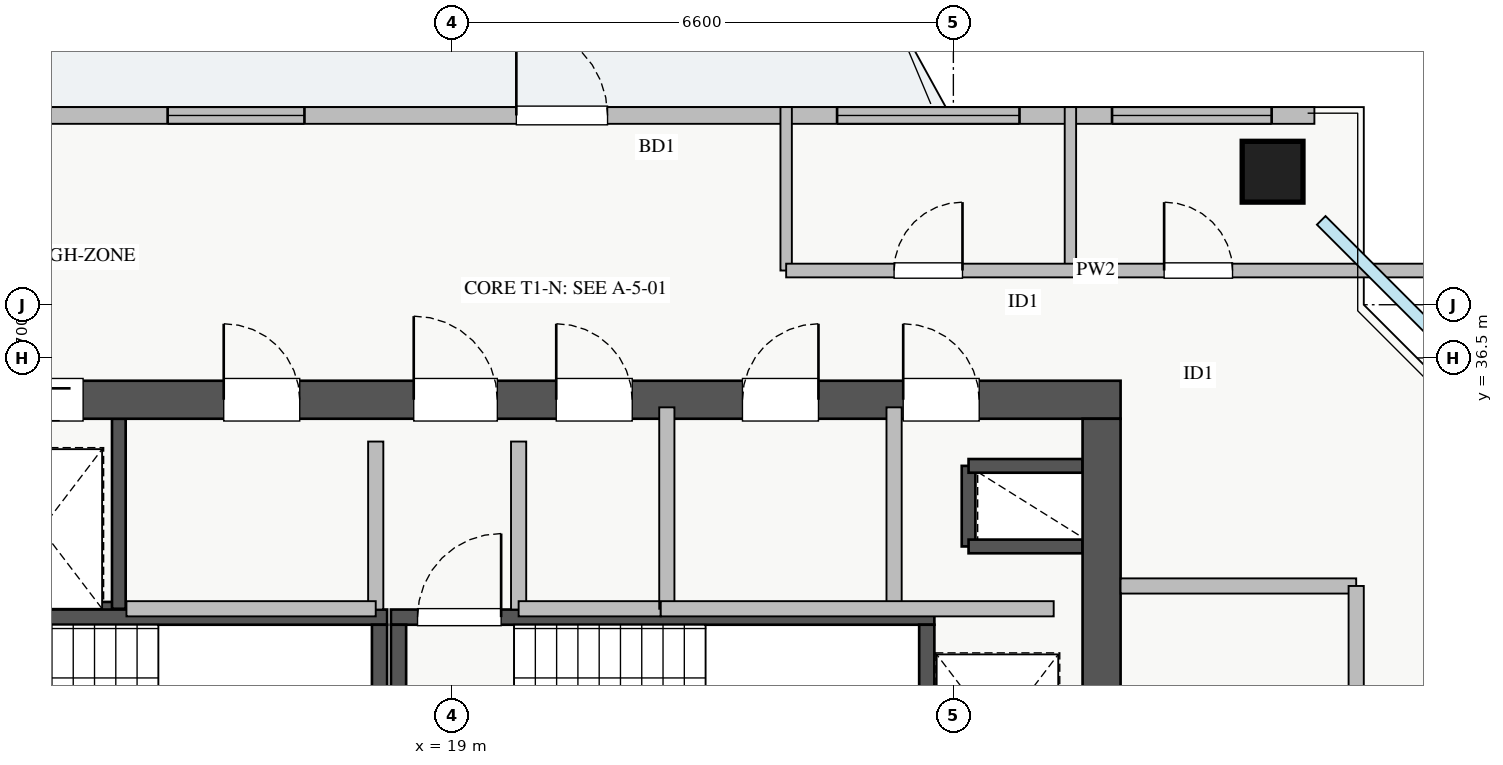
"""IFC4 building model, lengths in metres.
Left out: names, types, materials, properties, quantities, classifications, styles, units other than length and angle.
Written with IfcOpenShell. Run it as: python <this file> out.ifc"""

import sys

from ifc_helpers import new_model, si_unit, direction, frame, frame_2d, origin, origin_2d, place, context, subcontext, project, spatial, rectangle, extrude, source, transform, mapped, element, fill, save


model = new_model("IFC4")
c1 = context("Model", 3, precision=1e-05, world=origin(), true_north=direction((0.0, 1.0)))
c2 = subcontext(c1, "Body", "Model", "MODEL_VIEW")
j1 = project(units=[si_unit("LENGTHUNIT", "METRE"), si_unit("PLANEANGLEUNIT", "RADIAN")], contexts=[c1])
p1 = place(None, origin())
s1 = spatial("IfcSite", under=j1, at=p1, CompositionType="ELEMENT")
p2 = place(p1, origin())
s2 = spatial("IfcBuilding", under=s1, at=p2, CompositionType="ELEMENT")
p3 = place(p2, frame((0.0, 0.0, 216.5)))
s3 = spatial("IfcBuildingStorey", under=s2, at=p3, CompositionType="ELEMENT", Elevation=216.5)
p4 = place(p3, frame((12.68, 33.2, 0.0), z_axis=(0.0, 0.0, 1.0), x_axis=(1.0, 0.0, 0.0)))
e1 = element("IfcWall", 1, at=p4, inside=s3, PredefinedType="SHEAR", context=c2, shape_type="SweptSolid", body=[
    extrude(rectangle(XDim=1.94, YDim=0.18, at=frame_2d((0.97, 0.0))), origin(), (0.0, 0.0, 1.0), 3.07),
])
p5 = place(p3, frame((14.62, 33.2, 0.0), z_axis=(0.0, 0.0, 1.0), x_axis=(0.0, 1.0, 0.0)))
e2 = element("IfcWall", 2, at=p5, inside=s3, PredefinedType="SHEAR", context=c2, shape_type="SweptSolid", body=[
    extrude(rectangle(XDim=2.5, YDim=0.18, at=frame_2d((1.25, 0.0))), origin(), (0.0, 0.0, 1.0), 3.07),
])
p6 = place(p3, frame((25.8, 34.02, 0.0), z_axis=(0.0, 0.0, 1.0), x_axis=(0.0, 1.0, 0.0)))
e3 = element("IfcWall", 3, at=p6, inside=s3, PredefinedType="SHEAR", context=c2, shape_type="SweptSolid", body=[
    extrude(rectangle(XDim=1.06, YDim=0.18, at=frame_2d((0.53, 0.0))), origin(), (0.0, 0.0, 1.0), 3.07),
])
for number, where, z_axis, x_axis in (
    (4, (25.8, 35.08, 0.0), (0.0, 0.0, 1.0), (1.0, 0.0, 0.0)),
    (5, (25.8, 34.02, 0.0), (0.0, 0.0, 1.0), (1.0, 0.0, 0.0)),
):
    element("IfcWall", number, at=place(p3, frame(where, z_axis=z_axis, x_axis=x_axis)), inside=s3, PredefinedType="SHEAR", context=c2, shape_type="SweptSolid", body=[
        extrude(rectangle(XDim=1.5, YDim=0.18, at=frame_2d((0.75, 0.0))), origin(), (0.0, 0.0, 1.0), 3.07),
    ])
p7 = place(p3, frame((10.7, 33.09, 0.0), z_axis=(0.0, 0.0, 1.0), x_axis=(1.0, 0.0, 0.0)))
e6 = element("IfcWall", 6, at=p7, inside=s3, PredefinedType="SHEAR", context=c2, shape_type="SweptSolid", body=[
    extrude(rectangle(XDim=7.45, YDim=0.2, at=frame_2d((3.725, 0.0))), origin(), (0.0, 0.0, 1.0), 3.25),
])
p8 = place(p7, frame((0.35, 0.0, 0.0)))
e7 = element("IfcOpeningElement", 7, at=p8, cuts=e6, PredefinedType="OPENING", context=c2, shape_type="SweptSolid", body=[
    extrude(rectangle(XDim=1.1, YDim=2.05, at=frame_2d((0.55, 1.025))), frame((0.0, 0.11, 0.0), z_axis=(0.0, -1.0, 0.0), x_axis=(1.0, 0.0, 0.0)), (0.0, 0.0, 1.0), 0.22),
])
p9 = place(p3, frame((18.05, 30.05, 0.0), z_axis=(0.0, 0.0, 1.0), x_axis=(0.0, 1.0, 0.0)))
e8 = element("IfcWall", 8, at=p9, inside=s3, PredefinedType="SHEAR", context=c2, shape_type="SweptSolid", body=[
    extrude(rectangle(XDim=2.94, YDim=0.2, at=frame_2d((1.47, 0.0))), origin(), (0.0, 0.0, 1.0), 3.25),
])
p10 = place(p3, frame((18.2, 33.09, 0.0), z_axis=(0.0, 0.0, 1.0), x_axis=(1.0, 0.0, 0.0)))
e9 = element("IfcWall", 9, at=p10, inside=s3, PredefinedType="SHEAR", context=c2, shape_type="SweptSolid", body=[
    extrude(rectangle(XDim=7.15, YDim=0.2, at=frame_2d((3.575, 0.0))), origin(), (0.0, 0.0, 1.0), 3.25),
])
p11 = place(p10, frame((0.35, 0.0, 0.0)))
e10 = element("IfcOpeningElement", 10, at=p11, cuts=e9, PredefinedType="OPENING", context=c2, shape_type="SweptSolid", body=[
    extrude(rectangle(XDim=1.1, YDim=2.05, at=frame_2d((0.55, 1.025))), frame((0.0, 0.11, 0.0), z_axis=(0.0, -1.0, 0.0), x_axis=(1.0, 0.0, 0.0)), (0.0, 0.0, 1.0), 0.22),
])
for number, where, z_axis, x_axis in (
    (11, (18.3, 30.05, 0.0), (0.0, 0.0, 1.0), (0.0, 1.0, 0.0)),
    (12, (25.25, 30.05, 0.0), (0.0, 0.0, 1.0), (0.0, 1.0, 0.0)),
):
    element("IfcWall", number, at=place(p3, frame(where, z_axis=z_axis, x_axis=x_axis)), inside=s3, PredefinedType="SHEAR", context=c2, shape_type="SweptSolid", body=[
        extrude(rectangle(XDim=2.94, YDim=0.2, at=frame_2d((1.47, 0.0))), origin(), (0.0, 0.0, 1.0), 3.25),
    ])
p12 = place(p3, frame((10.2, 35.95, 0.0), z_axis=(0.0, 0.0, 1.0), x_axis=(1.0, 0.0, 0.0)))
e13 = element("IfcWall", 13, at=p12, inside=s3, PredefinedType="SHEAR", context=c2, shape_type="SweptSolid", body=[
    extrude(rectangle(XDim=17.6, YDim=0.5, at=frame_2d((8.8, 0.0))), origin(), (0.0, 0.0, 1.0), 3.25),
])
p13 = place(p12, frame((1.15, 0.0, 0.0)))
e14 = element("IfcOpeningElement", 14, at=p13, cuts=e13, PredefinedType="OPENING", context=c2, shape_type="SweptSolid", body=[
    extrude(rectangle(XDim=1.1, YDim=2.05, at=frame_2d((0.55, 1.025))), frame((0.0, 0.26, 0.0), z_axis=(0.0, -1.0, 0.0), x_axis=(1.0, 0.0, 0.0)), (0.0, 0.0, 1.0), 0.52),
])
p14 = place(p12, frame((8.3, 0.0, 0.0)))
e15 = element("IfcOpeningElement", 15, at=p14, cuts=e13, PredefinedType="OPENING", context=c2, shape_type="SweptSolid", body=[
    extrude(rectangle(XDim=1.1, YDim=2.05, at=frame_2d((0.55, 1.025))), frame((0.0, 0.26, 0.0), z_axis=(0.0, -1.0, 0.0), x_axis=(1.0, 0.0, 0.0)), (0.0, 0.0, 1.0), 0.52),
])
p15 = place(p12, frame((2.85, 0.0, 0.0)))
e16 = element("IfcOpeningElement", 16, at=p15, cuts=e13, PredefinedType="OPENING", context=c2, shape_type="SweptSolid", body=[
    extrude(rectangle(XDim=1.1, YDim=2.05, at=frame_2d((0.55, 1.025))), frame((0.0, 0.26, 0.0), z_axis=(0.0, -1.0, 0.0), x_axis=(1.0, 0.0, 0.0)), (0.0, 0.0, 1.0), 0.52),
])
p16 = place(p12, frame((5.8, 0.0, 0.0)))
e17 = element("IfcOpeningElement", 17, at=p16, cuts=e13, PredefinedType="OPENING", context=c2, shape_type="SweptSolid", body=[
    extrude(rectangle(XDim=1.0, YDim=2.05, at=frame_2d((0.5, 1.025))), frame((0.0, 0.26, 0.0), z_axis=(0.0, -1.0, 0.0), x_axis=(1.0, 0.0, 0.0)), (0.0, 0.0, 1.0), 0.52),
])
p17 = place(p12, frame((14.74, 0.0, 0.0)))
e18 = element("IfcOpeningElement", 18, at=p17, cuts=e13, PredefinedType="OPENING", context=c2, shape_type="SweptSolid", body=[
    extrude(rectangle(XDim=1.0, YDim=2.05, at=frame_2d((0.5, 1.025))), frame((0.0, 0.26, 0.0), z_axis=(0.0, -1.0, 0.0), x_axis=(1.0, 0.0, 0.0)), (0.0, 0.0, 1.0), 0.52),
])
p18 = place(p12, frame((10.175, 0.0, 0.0)))
e19 = element("IfcOpeningElement", 19, at=p18, cuts=e13, PredefinedType="OPENING", context=c2, shape_type="SweptSolid", body=[
    extrude(rectangle(XDim=1.0, YDim=2.05, at=frame_2d((0.5, 1.025))), frame((0.0, 0.26, 0.0), z_axis=(0.0, -1.0, 0.0), x_axis=(1.0, 0.0, 0.0)), (0.0, 0.0, 1.0), 0.52),
])
p19 = place(p12, frame((12.625, 0.0, 0.0)))
e20 = element("IfcOpeningElement", 20, at=p19, cuts=e13, PredefinedType="OPENING", context=c2, shape_type="SweptSolid", body=[
    extrude(rectangle(XDim=1.0, YDim=2.05, at=frame_2d((0.5, 1.025))), frame((0.0, 0.26, 0.0), z_axis=(0.0, -1.0, 0.0), x_axis=(1.0, 0.0, 0.0)), (0.0, 0.0, 1.0), 0.52),
])
p20 = place(p3, frame((27.55, 29.5, 0.0), z_axis=(0.0, 0.0, 1.0), x_axis=(0.0, 1.0, 0.0)))
e21 = element("IfcWall", 21, at=p20, inside=s3, PredefinedType="SHEAR", context=c2, shape_type="SweptSolid", body=[
    extrude(rectangle(XDim=6.2, YDim=0.5, at=frame_2d((3.1, 0.0))), origin(), (0.0, 0.0, 1.0), 3.25),
])
p21 = place(p20, frame((1.1, 0.0, 0.0)))
e22 = element("IfcOpeningElement", 22, at=p21, cuts=e21, PredefinedType="OPENING", context=c2, shape_type="SweptSolid", body=[
    extrude(rectangle(XDim=1.3, YDim=2.05, at=frame_2d((0.65, 1.025))), frame((0.0, 0.26, 0.0), z_axis=(0.0, -1.0, 0.0), x_axis=(1.0, 0.0, 0.0)), (0.0, 0.0, 1.0), 0.52),
])
m1 = source(origin(), c2, "Body", "SweptSolid", [
    extrude(rectangle(XDim=0.8, YDim=0.8, at=origin_2d()), origin(), (0.0, 0.0, 1.0), 3.25),
])
p22 = place(p3, frame((29.8, 38.95, 0.0), z_axis=(0.0, 0.0, 1.0), x_axis=(1.0, 0.0, 0.0)))
e23 = element("IfcColumn", 23, at=p22, inside=s3, PredefinedType="COLUMN", context=c2, shape_type="MappedRepresentation", body=[
    mapped(m1, transform((0.0, 0.0, 0.0), x_axis=(1.0, 0.0, 0.0), y_axis=(0.0, 1.0, 0.0), z_axis=(0.0, 0.0, 1.0), scale=1.0)),
])
p23 = place(p3, frame((7.65, 39.69, 0.0), z_axis=(0.0, 0.0, 1.0), x_axis=(1.0, 0.0, 0.0)))
e24 = element("IfcWall", 24, at=p23, inside=s3, PredefinedType="STANDARD", context=c2, shape_type="SweptSolid", body=[
    extrude(rectangle(XDim=22.7, YDim=0.22, at=frame_2d((11.35, 0.0))), origin(), (0.0, 0.0, 1.0), 2.61),
])
p24 = place(p23, frame((12.2, 0.0, 0.0)))
e25 = element("IfcOpeningElement", 25, at=p24, cuts=e24, PredefinedType="OPENING", context=c2, shape_type="SweptSolid", body=[
    extrude(rectangle(XDim=1.2, YDim=2.1, at=frame_2d((0.6, 1.05))), frame((0.0, 0.12, 0.0), z_axis=(0.0, -1.0, 0.0), x_axis=(1.0, 0.0, 0.0)), (0.0, 0.0, 1.0), 0.24),
])
p25 = place(p23, frame((1.637, 0.0, 0.9)))
e26 = element("IfcOpeningElement", 26, at=p25, cuts=e24, PredefinedType="OPENING", context=c2, shape_type="SweptSolid", body=[
    extrude(rectangle(XDim=2.4, YDim=1.48, at=frame_2d((1.2, 0.74))), frame((0.0, 0.12, 0.0), z_axis=(0.0, -1.0, 0.0), x_axis=(1.0, 0.0, 0.0)), (0.0, 0.0, 1.0), 0.24),
])
p26 = place(p23, frame((7.612, 0.0, 0.9)))
e27 = element("IfcOpeningElement", 27, at=p26, cuts=e24, PredefinedType="OPENING", context=c2, shape_type="SweptSolid", body=[
    extrude(rectangle(XDim=1.8, YDim=1.45, at=frame_2d((0.9, 0.725))), frame((0.0, 0.12, 0.0), z_axis=(0.0, -1.0, 0.0), x_axis=(1.0, 0.0, 0.0)), (0.0, 0.0, 1.0), 0.24),
])
p27 = place(p23, frame((20.038, 0.0, 0.9)))
e28 = element("IfcOpeningElement", 28, at=p27, cuts=e24, PredefinedType="OPENING", context=c2, shape_type="SweptSolid", body=[
    extrude(rectangle(XDim=2.1, YDim=1.5, at=frame_2d((1.05, 0.75))), frame((0.0, 0.12, 0.0), z_axis=(0.0, -1.0, 0.0), x_axis=(1.0, 0.0, 0.0)), (0.0, 0.0, 1.0), 0.24),
])
p28 = place(p23, frame((16.42, 0.0, 0.9)))
e29 = element("IfcOpeningElement", 29, at=p28, cuts=e24, PredefinedType="OPENING", context=c2, shape_type="SweptSolid", body=[
    extrude(rectangle(XDim=2.4, YDim=1.5, at=frame_2d((1.2, 0.75))), frame((0.0, 0.12, 0.0), z_axis=(0.0, -1.0, 0.0), x_axis=(1.0, 0.0, 0.0)), (0.0, 0.0, 1.0), 0.24),
])
p29 = place(p3, frame((27.8, 33.5, 0.0), z_axis=(0.0, 0.0, 1.0), x_axis=(1.0, 0.0, 0.0)))
e30 = element("IfcWall", 30, at=p29, inside=s3, PredefinedType="PARTITIONING", context=c2, shape_type="SweptSolid", body=[
    extrude(rectangle(XDim=3.1, YDim=0.2, at=frame_2d((1.55, 0.0))), origin(), (0.0, 0.0, 1.0), 2.265),
])
p30 = place(p3, frame((30.9, 29.6, 0.0), z_axis=(0.0, 0.0, 1.0), x_axis=(0.0, 1.0, 0.0)))
e31 = element("IfcWall", 31, at=p30, inside=s3, PredefinedType="PARTITIONING", context=c2, shape_type="SweptSolid", body=[
    extrude(rectangle(XDim=3.9, YDim=0.2, at=frame_2d((1.95, 0.0))), origin(), (0.0, 0.0, 1.0), 3.07),
])
p31 = place(p30, frame((1.4, 0.0, 0.0)))
e32 = element("IfcOpeningElement", 32, at=p31, cuts=e31, PredefinedType="OPENING", context=c2, shape_type="SweptSolid", body=[
    extrude(rectangle(XDim=1.1, YDim=2.05, at=frame_2d((0.55, 1.025))), frame((0.0, 0.11, 0.0), z_axis=(0.0, -1.0, 0.0), x_axis=(1.0, 0.0, 0.0)), (0.0, 0.0, 1.0), 0.22),
])
for number, where, z_axis, x_axis in (
    (33, (18.0, 33.19, 0.0), (0.0, 0.0, 1.0), (0.0, 1.0, 0.0)),
    (34, (19.88, 33.19, 0.0), (0.0, 0.0, 1.0), (0.0, 1.0, 0.0)),
):
    element("IfcWall", number, at=place(p3, frame(where, z_axis=z_axis, x_axis=x_axis)), inside=s3, PredefinedType="PARTITIONING", context=c2, shape_type="SweptSolid", body=[
        extrude(rectangle(XDim=2.21, YDim=0.2, at=frame_2d((1.105, 0.0))), origin(), (0.0, 0.0, 1.0), 3.07),
    ])
p32 = place(p3, frame((14.72, 33.2, 0.0), z_axis=(0.0, 0.0, 1.0), x_axis=(1.0, 0.0, 0.0)))
e35 = element("IfcWall", 35, at=p32, inside=s3, PredefinedType="PARTITIONING", context=c2, shape_type="SweptSolid", body=[
    extrude(rectangle(XDim=3.28, YDim=0.2, at=frame_2d((1.64, 0.0))), origin(), (0.0, 0.0, 1.0), 3.07),
])
p33 = place(p3, frame((24.82, 33.2, 0.0), z_axis=(0.0, 0.0, 1.0), x_axis=(0.0, 1.0, 0.0)))
e36 = element("IfcWall", 36, at=p33, inside=s3, PredefinedType="PARTITIONING", context=c2, shape_type="SweptSolid", body=[
    extrude(rectangle(XDim=2.65, YDim=0.2, at=frame_2d((1.325, 0.0))), origin(), (0.0, 0.0, 1.0), 3.07),
])
p34 = place(p3, frame((19.88, 33.2, 0.0), z_axis=(0.0, 0.0, 1.0), x_axis=(1.0, 0.0, 0.0)))
e37 = element("IfcWall", 37, at=p34, inside=s3, PredefinedType="PARTITIONING", context=c2, shape_type="SweptSolid", body=[
    extrude(rectangle(XDim=1.87, YDim=0.2, at=frame_2d((0.935, 0.0))), origin(), (0.0, 0.0, 1.0), 3.07),
])
p35 = place(p3, frame((21.83, 33.2, 0.0), z_axis=(0.0, 0.0, 1.0), x_axis=(0.0, 1.0, 0.0)))
e38 = element("IfcWall", 38, at=p35, inside=s3, PredefinedType="PARTITIONING", context=c2, shape_type="SweptSolid", body=[
    extrude(rectangle(XDim=2.65, YDim=0.2, at=frame_2d((1.325, 0.0))), origin(), (0.0, 0.0, 1.0), 3.07),
])
p36 = place(p3, frame((21.75, 33.2, 0.0), z_axis=(0.0, 0.0, 1.0), x_axis=(1.0, 0.0, 0.0)))
e39 = element("IfcWall", 39, at=p36, inside=s3, PredefinedType="PARTITIONING", context=c2, shape_type="SweptSolid", body=[
    extrude(rectangle(XDim=5.17, YDim=0.2, at=frame_2d((2.585, 0.0))), origin(), (0.0, 0.0, 1.0), 3.07),
])
for number, where, z_axis, x_axis in (
    (40, (23.4, 37.65, 0.0), (0.0, 0.0, 1.0), (0.0, 1.0, 0.0)),
    (41, (27.14, 37.65, 0.0), (0.0, 0.0, 1.0), (0.0, 1.0, 0.0)),
):
    element("IfcWall", number, at=place(p3, frame(where, z_axis=z_axis, x_axis=x_axis)), inside=s3, PredefinedType="PARTITIONING", context=c2, shape_type="SweptSolid", body=[
        extrude(rectangle(XDim=2.15, YDim=0.15, at=frame_2d((1.075, 0.0))), origin(), (0.0, 0.0, 1.0), 3.07),
    ])
p37 = place(p3, frame((23.4, 37.65, 0.0), z_axis=(0.0, 0.0, 1.0), x_axis=(1.0, 0.0, 0.0)))
e42 = element("IfcWall", 42, at=p37, inside=s3, PredefinedType="PARTITIONING", context=c2, shape_type="SweptSolid", body=[
    extrude(rectangle(XDim=9.05, YDim=0.18, at=frame_2d((4.525, 0.0))), origin(), (0.0, 0.0, 1.0), 3.07),
])
p38 = place(p37, frame((1.42, 0.0, 0.0)))
e43 = element("IfcOpeningElement", 43, at=p38, cuts=e42, PredefinedType="OPENING", context=c2, shape_type="SweptSolid", body=[
    extrude(rectangle(XDim=0.9, YDim=2.05, at=frame_2d((0.45, 1.025))), frame((0.0, 0.1, 0.0), z_axis=(0.0, -1.0, 0.0), x_axis=(1.0, 0.0, 0.0)), (0.0, 0.0, 1.0), 0.2),
])
p39 = place(p37, frame((4.973, 0.0, 0.0)))
e44 = element("IfcOpeningElement", 44, at=p39, cuts=e42, PredefinedType="OPENING", context=c2, shape_type="SweptSolid", body=[
    extrude(rectangle(XDim=0.9, YDim=2.05, at=frame_2d((0.45, 1.025))), frame((0.0, 0.1, 0.0), z_axis=(0.0, -1.0, 0.0), x_axis=(1.0, 0.0, 0.0)), (0.0, 0.0, 1.0), 0.2),
])
m2 = source(origin(), c2, "Body", "SweptSolid", [
    extrude(rectangle(XDim=1.2, YDim=2.1, at=frame_2d((0.6, 1.05))), frame((0.0, 0.025, 0.0), z_axis=(0.0, -1.0, 0.0), x_axis=(1.0, 0.0, 0.0)), (0.0, 0.0, 1.0), 0.05),
])
p40 = place(p24, origin())
e45 = element("IfcDoor", 45, at=p40, inside=s3, OperationType="SINGLE_SWING_LEFT", PredefinedType="DOOR", context=c2, shape_type="MappedRepresentation", body=[
    mapped(m2, transform((0.0, 0.0, 0.0), x_axis=(1.0, 0.0, 0.0), y_axis=(0.0, 1.0, 0.0), z_axis=(0.0, 0.0, 1.0), scale=1.0)),
])
fill(e25, e45)
m3 = source(origin(), c2, "Body", "SweptSolid", [
    extrude(rectangle(XDim=1.8, YDim=1.45, at=frame_2d((0.9, 0.725))), frame((0.0, 0.03, 0.0), z_axis=(0.0, -1.0, 0.0), x_axis=(1.0, 0.0, 0.0)), (0.0, 0.0, 1.0), 0.06),
])
p41 = place(p26, origin())
e46 = element("IfcWindow", 46, at=p41, inside=s3, PartitioningType="DOUBLE_PANEL_VERTICAL", PredefinedType="WINDOW", context=c2, shape_type="MappedRepresentation", body=[
    mapped(m3, transform((0.0, 0.0, 0.0), x_axis=(1.0, 0.0, 0.0), y_axis=(0.0, 1.0, 0.0), z_axis=(0.0, 0.0, 1.0), scale=1.0)),
])
fill(e27, e46)
m4 = source(origin(), c2, "Body", "SweptSolid", [
    extrude(rectangle(XDim=2.1, YDim=1.5, at=frame_2d((1.05, 0.75))), frame((0.0, 0.03, 0.0), z_axis=(0.0, -1.0, 0.0), x_axis=(1.0, 0.0, 0.0)), (0.0, 0.0, 1.0), 0.06),
])
p42 = place(p27, origin())
e47 = element("IfcWindow", 47, at=p42, inside=s3, PartitioningType="TRIPLE_PANEL_VERTICAL", PredefinedType="WINDOW", context=c2, shape_type="MappedRepresentation", body=[
    mapped(m4, transform((0.0, 0.0, 0.0), x_axis=(1.0, 0.0, 0.0), y_axis=(0.0, 1.0, 0.0), z_axis=(0.0, 0.0, 1.0), scale=1.0)),
])
fill(e28, e47)
m5 = source(origin(), c2, "Body", "SweptSolid", [
    extrude(rectangle(XDim=1.1, YDim=2.05, at=frame_2d((0.55, 1.025))), frame((0.0, 0.025, 0.0), z_axis=(0.0, -1.0, 0.0), x_axis=(1.0, 0.0, 0.0)), (0.0, 0.0, 1.0), 0.05),
])
p43 = place(p14, origin())
e48 = element("IfcDoor", 48, at=p43, inside=s3, OperationType="SINGLE_SWING_LEFT", PredefinedType="DOOR", context=c2, shape_type="MappedRepresentation", body=[
    mapped(m5, transform((0.0, 0.0, 0.0), x_axis=(1.0, 0.0, 0.0), y_axis=(0.0, 1.0, 0.0), z_axis=(0.0, 0.0, 1.0), scale=1.0)),
])
fill(e15, e48)
p44 = place(p11, origin())
e49 = element("IfcDoor", 49, at=p44, inside=s3, OperationType="SINGLE_SWING_RIGHT", PredefinedType="DOOR", context=c2, shape_type="MappedRepresentation", body=[
    mapped(m5, transform((0.0, 0.0, 0.0), x_axis=(1.0, 0.0, 0.0), y_axis=(0.0, 1.0, 0.0), z_axis=(0.0, 0.0, 1.0), scale=1.0)),
])
fill(e10, e49)
p45 = place(p15, origin())
e50 = element("IfcDoor", 50, at=p45, inside=s3, OperationType="SLIDING_TO_LEFT", PredefinedType="DOOR", context=c2, shape_type="MappedRepresentation", body=[
    mapped(m5, transform((0.0, 0.0, 0.0), x_axis=(1.0, 0.0, 0.0), y_axis=(0.0, 1.0, 0.0), z_axis=(0.0, 0.0, 1.0), scale=1.0)),
])
fill(e16, e50)
m6 = source(origin(), c2, "Body", "SweptSolid", [
    extrude(rectangle(XDim=1.0, YDim=2.05, at=frame_2d((0.5, 1.025))), frame((0.0, 0.025, 0.0), z_axis=(0.0, -1.0, 0.0), x_axis=(1.0, 0.0, 0.0)), (0.0, 0.0, 1.0), 0.05),
])
p46 = place(p16, origin())
e51 = element("IfcDoor", 51, at=p46, inside=s3, OperationType="SINGLE_SWING_LEFT", PredefinedType="DOOR", context=c2, shape_type="MappedRepresentation", body=[
    mapped(m6, transform((0.0, 0.0, 0.0), x_axis=(1.0, 0.0, 0.0), y_axis=(0.0, 1.0, 0.0), z_axis=(0.0, 0.0, 1.0), scale=1.0)),
])
fill(e17, e51)
p47 = place(p17, origin())
e52 = element("IfcDoor", 52, at=p47, inside=s3, OperationType="SINGLE_SWING_LEFT", PredefinedType="DOOR", context=c2, shape_type="MappedRepresentation", body=[
    mapped(m6, transform((0.0, 0.0, 0.0), x_axis=(1.0, 0.0, 0.0), y_axis=(0.0, 1.0, 0.0), z_axis=(0.0, 0.0, 1.0), scale=1.0)),
])
fill(e18, e52)
p48 = place(p18, origin())
e53 = element("IfcDoor", 53, at=p48, inside=s3, OperationType="SINGLE_SWING_LEFT", PredefinedType="DOOR", context=c2, shape_type="MappedRepresentation", body=[
    mapped(m6, transform((0.0, 0.0, 0.0), x_axis=(1.0, 0.0, 0.0), y_axis=(0.0, 1.0, 0.0), z_axis=(0.0, 0.0, 1.0), scale=1.0)),
])
fill(e19, e53)
p49 = place(p19, origin())
e54 = element("IfcDoor", 54, at=p49, inside=s3, OperationType="SINGLE_SWING_RIGHT", PredefinedType="DOOR", context=c2, shape_type="MappedRepresentation", body=[
    mapped(m6, transform((0.0, 0.0, 0.0), x_axis=(1.0, 0.0, 0.0), y_axis=(0.0, 1.0, 0.0), z_axis=(0.0, 0.0, 1.0), scale=1.0)),
])
fill(e20, e54)
m7 = source(origin(), c2, "Body", "SweptSolid", [
    extrude(rectangle(XDim=0.9, YDim=2.05, at=frame_2d((0.45, 1.025))), frame((0.0, 0.025, 0.0), z_axis=(0.0, -1.0, 0.0), x_axis=(1.0, 0.0, 0.0)), (0.0, 0.0, 1.0), 0.05),
])
p50 = place(p38, origin())
e55 = element("IfcDoor", 55, at=p50, inside=s3, OperationType="SINGLE_SWING_RIGHT", PredefinedType="DOOR", context=c2, shape_type="MappedRepresentation", body=[
    mapped(m7, transform((0.0, 0.0, 0.0), x_axis=(1.0, 0.0, 0.0), y_axis=(0.0, 1.0, 0.0), z_axis=(0.0, 0.0, 1.0), scale=1.0)),
])
fill(e43, e55)
p51 = place(p39, origin())
e56 = element("IfcDoor", 56, at=p51, inside=s3, OperationType="SINGLE_SWING_LEFT", PredefinedType="DOOR", context=c2, shape_type="MappedRepresentation", body=[
    mapped(m7, transform((0.0, 0.0, 0.0), x_axis=(1.0, 0.0, 0.0), y_axis=(0.0, 1.0, 0.0), z_axis=(0.0, 0.0, 1.0), scale=1.0)),
])
fill(e44, e56)
m8 = source(origin(), c2, "Body", "SweptSolid", [
    extrude(rectangle(XDim=2.4, YDim=1.5, at=frame_2d((1.2, 0.75))), frame((0.0, 0.03, 0.0), z_axis=(0.0, -1.0, 0.0), x_axis=(1.0, 0.0, 0.0)), (0.0, 0.0, 1.0), 0.06),
])
p52 = place(p28, origin())
e57 = element("IfcWindow", 57, at=p52, inside=s3, PartitioningType="TRIPLE_PANEL_VERTICAL", PredefinedType="WINDOW", context=c2, shape_type="MappedRepresentation", body=[
    mapped(m8, transform((0.0, 0.0, 0.0), x_axis=(1.0, 0.0, 0.0), y_axis=(0.0, 1.0, 0.0), z_axis=(0.0, 0.0, 1.0), scale=1.0)),
])
fill(e29, e57)
save(model, sys.argv[1])
